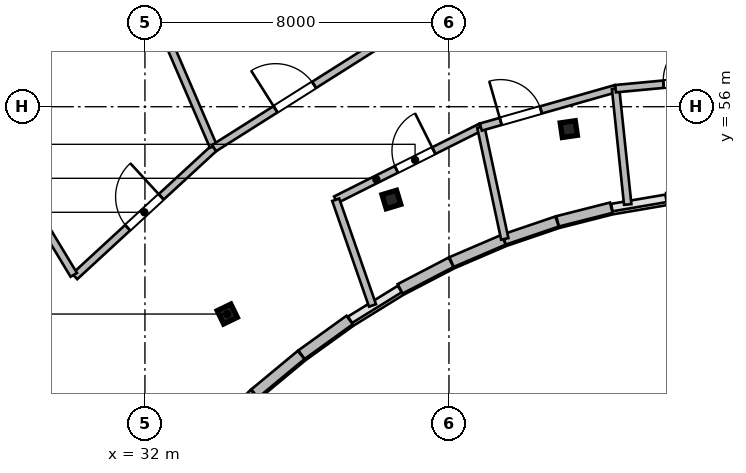
"""IFC4 building model, lengths in metres.
Left out: names, types, materials, properties, quantities, classifications, styles, units other than length and angle.
Written with IfcOpenShell. Run it as: python <this file> out.ifc"""

import sys

from ifc_helpers import new_model, si_unit, direction, frame, frame_2d, origin, origin_2d, place, context, subcontext, project, spatial, rectangle, i_section, extrude, source, transform, mapped, element, fill, save


model = new_model("IFC4")
c1 = context("Model", 3, precision=1e-05, world=origin(), true_north=direction((0.0, 1.0)))
c2 = subcontext(c1, "Body", "Model", "MODEL_VIEW")
j1 = project(units=[si_unit("LENGTHUNIT", "METRE"), si_unit("PLANEANGLEUNIT", "RADIAN")], contexts=[c1])
p1 = place(None, origin())
s1 = spatial("IfcSite", under=j1, at=p1, CompositionType="ELEMENT")
p2 = place(p1, origin())
s2 = spatial("IfcBuilding", under=s1, at=p2, CompositionType="ELEMENT")
p3 = place(p2, frame((0.0, 0.0, 279.6)))
s3 = spatial("IfcBuildingStorey", under=s2, at=p3, CompositionType="ELEMENT", Elevation=279.6)
m1 = source(origin(), c2, "Body", "SweptSolid", [
    extrude(i_section(OverallWidth=0.399, OverallDepth=0.387, WebThickness=0.021, FlangeThickness=0.033, at=origin_2d()), origin(), (0.0, 0.0, 1.0), 3.9),
])
for number, where, z_axis, x_axis in (
    (1, (34.166, 50.545, 0.0), (0.0, 0.0, 1.0), (-0.436, 0.9, 0.0)),
    (2, (38.485, 53.558, 0.0), (0.0, 0.0, 1.0), (-0.289, 0.957, 0.0)),
    (3, (43.154, 55.411, 0.0), (0.0, 0.0, 1.0), (-0.143, 0.99, 0.0)),
):
    element("IfcColumn", number, at=place(p3, frame(where, z_axis=z_axis, x_axis=x_axis)), inside=s3, PredefinedType="COLUMN", context=c2, shape_type="MappedRepresentation", body=[
        mapped(m1, transform((0.0, 0.0, 0.0), scale=1.0)),
    ])
m2 = source(origin(), c2, "Body", "SweptSolid", [
    extrude(rectangle(XDim=1.458, YDim=0.28, at=frame_2d((0.729, 0.0))), origin(), (0.0, 0.0, 1.0), 3.64),
])
p4 = place(p3, frame((44.271, 53.343, 0.0), z_axis=(0.0, 0.0, 1.0), x_axis=(-0.969109544438, -0.246630677083, 0.0)))
e4 = element("IfcWall", 4, at=p4, inside=s3, PredefinedType="SOLIDWALL", context=c2, shape_type="MappedRepresentation", body=[
    mapped(m2, transform((0.0, 0.0, 0.0), scale=1.0)),
])
m3 = source(origin(), c2, "Body", "SweptSolid", [
    extrude(rectangle(XDim=1.473, YDim=0.28, at=frame_2d((0.736, 0.0))), origin(), (0.0, 0.0, 1.0), 3.64),
])
p5 = place(p3, frame((42.845, 52.979, 0.0), z_axis=(0.0, 0.0, 1.0), x_axis=(-0.946641296917, -0.322289086026, 0.0)))
e5 = element("IfcWall", 5, at=p5, inside=s3, PredefinedType="SOLIDWALL", context=c2, shape_type="MappedRepresentation", body=[
    mapped(m3, transform((0.0, 0.0, 0.0), scale=1.0)),
])
m4 = source(origin(), c2, "Body", "SweptSolid", [
    extrude(rectangle(XDim=1.49, YDim=0.28, at=frame_2d((0.745, 0.0))), origin(), (0.0, 0.0, 1.0), 3.64),
])
p6 = place(p3, frame((41.438, 52.5, 0.0), z_axis=(0.0, 0.0, 1.0), x_axis=(-0.919009427656, -0.394235553799, 0.0)))
e6 = element("IfcWall", 6, at=p6, inside=s3, PredefinedType="SOLIDWALL", context=c2, shape_type="MappedRepresentation", body=[
    mapped(m4, transform((0.0, 0.0, 0.0), scale=1.0)),
])
m5 = source(origin(), c2, "Body", "SweptSolid", [
    extrude(rectangle(XDim=1.512, YDim=0.28, at=frame_2d((0.756, 0.0))), origin(), (0.0, 0.0, 1.0), 3.64),
])
p7 = place(p3, frame((40.056, 51.906, 0.0), z_axis=(0.0, 0.0, 1.0), x_axis=(-0.886841011195, -0.462074691865, 0.0)))
e7 = element("IfcWall", 7, at=p7, inside=s3, PredefinedType="SOLIDWALL", context=c2, shape_type="MappedRepresentation", body=[
    mapped(m5, transform((0.0, 0.0, 0.0), scale=1.0)),
])
m6 = source(origin(), c2, "Body", "SweptSolid", [
    extrude(rectangle(XDim=1.561, YDim=0.28, at=frame_2d((0.781, 0.0))), origin(), (0.0, 0.0, 1.0), 3.64),
])
p8 = place(p3, frame((37.387, 50.387, 0.0), z_axis=(0.0, 0.0, 1.0), x_axis=(-0.81154027425, -0.584296485758, 0.0)))
e8 = element("IfcWall", 8, at=p8, inside=s3, PredefinedType="SOLIDWALL", context=c2, shape_type="MappedRepresentation", body=[
    mapped(m6, transform((0.0, 0.0, 0.0), scale=1.0)),
])
m7 = source(origin(), c2, "Body", "SweptSolid", [
    extrude(rectangle(XDim=1.589, YDim=0.28, at=frame_2d((0.794, 0.0))), origin(), (0.0, 0.0, 1.0), 3.64),
])
p9 = place(p3, frame((36.11, 49.468, 0.0), z_axis=(0.0, 0.0, 1.0), x_axis=(-0.769805836273, -0.63827813251, 0.0)))
e9 = element("IfcWall", 9, at=p9, inside=s3, PredefinedType="SOLIDWALL", context=c2, shape_type="MappedRepresentation", body=[
    mapped(m7, transform((0.0, 0.0, 0.0), scale=1.0)),
])
m8 = source(origin(), c2, "Body", "SweptSolid", [
    extrude(rectangle(XDim=1.577, YDim=0.28, at=frame_2d((0.789, 0.0))), origin(), (0.0, 0.0, 1.0), 3.64),
])
p10 = place(p3, frame((34.878, 48.446, 0.0), z_axis=(0.0, 0.0, 1.0), x_axis=(-0.726119464467, -0.687568558998, 0.0)))
e10 = element("IfcWall", 10, at=p10, inside=s3, PredefinedType="SOLIDWALL", context=c2, shape_type="MappedRepresentation", body=[
    mapped(m8, transform((0.0, 0.0, 0.0), scale=1.0)),
])
m9 = source(origin(), c2, "Body", "SweptSolid", [
    extrude(rectangle(XDim=4.271, YDim=0.195, at=frame_2d((2.135, 0.0))), origin(), (0.0, 0.0, 1.0), 3.64),
])
p11 = place(p3, frame((37.021, 53.552, 0.0), z_axis=(0.0, 0.0, 1.0), x_axis=(0.894061035522, 0.447945158207, 0.0)))
e11 = element("IfcWall", 11, at=p11, inside=s3, PredefinedType="PARTITIONING", context=c2, shape_type="MappedRepresentation", body=[
    mapped(m9, transform((0.0, 0.0, 0.0), scale=1.0)),
])
p12 = place(p11, frame((1.785, 0.0, 0.0)))
e12 = element("IfcOpeningElement", 12, at=p12, cuts=e11, PredefinedType="OPENING", context=c2, shape_type="SweptSolid", body=[
    extrude(rectangle(XDim=1.1, YDim=2.15, at=frame_2d((0.55, 1.075))), frame((0.0, 0.107, 0.0), z_axis=(0.0, -1.0, 0.0), x_axis=(1.0, 0.0, 0.0)), (0.0, 0.0, 1.0), 0.215),
])
m10 = source(origin(), c2, "Body", "SweptSolid", [
    extrude(rectangle(XDim=2.944, YDim=0.195, at=frame_2d((1.472, 0.0))), origin(), (0.0, 0.0, 1.0), 3.64),
])
p13 = place(p3, frame((37.988, 50.771, 0.0), z_axis=(0.0, 0.0, 1.0), x_axis=(-0.328565655286, 0.944481132774, 0.0)))
e13 = element("IfcWall", 13, at=p13, inside=s3, PredefinedType="PARTITIONING", context=c2, shape_type="MappedRepresentation", body=[
    mapped(m10, transform((0.0, 0.0, 0.0), scale=1.0)),
])
m11 = source(origin(), c2, "Body", "SweptSolid", [
    extrude(rectangle(XDim=3.01, YDim=0.195, at=frame_2d((1.505, 0.0))), origin(), (0.0, 0.0, 1.0), 3.64),
])
p14 = place(p3, frame((41.469, 52.521, 0.0), z_axis=(0.0, 0.0, 1.0), x_axis=(-0.209279797988, 0.977855800287, 0.0)))
e14 = element("IfcWall", 14, at=p14, inside=s3, PredefinedType="PARTITIONING", context=c2, shape_type="MappedRepresentation", body=[
    mapped(m11, transform((0.0, 0.0, 0.0), scale=1.0)),
])
m12 = source(origin(), c2, "Body", "SweptSolid", [
    extrude(rectangle(XDim=3.687, YDim=0.195, at=frame_2d((1.843, 0.0))), origin(), (0.0, 0.0, 1.0), 3.64),
])
p15 = place(p3, frame((40.839, 55.465, 0.0), z_axis=(0.0, 0.0, 1.0), x_axis=(0.961753532248, 0.27391630694, 0.0)))
e15 = element("IfcWall", 15, at=p15, inside=s3, PredefinedType="PARTITIONING", context=c2, shape_type="MappedRepresentation", body=[
    mapped(m12, transform((0.0, 0.0, 0.0), scale=1.0)),
])
p16 = place(p15, frame((0.543, 0.0, 0.0)))
e16 = element("IfcOpeningElement", 16, at=p16, cuts=e15, PredefinedType="OPENING", context=c2, shape_type="SweptSolid", body=[
    extrude(rectangle(XDim=1.1, YDim=2.15, at=frame_2d((0.55, 1.075))), frame((0.0, 0.107, 0.0), z_axis=(0.0, -1.0, 0.0), x_axis=(1.0, 0.0, 0.0)), (0.0, 0.0, 1.0), 0.215),
])
m13 = source(origin(), c2, "Body", "SweptSolid", [
    extrude(rectangle(XDim=3.063, YDim=0.195, at=frame_2d((1.532, 0.0))), origin(), (0.0, 0.0, 1.0), 3.64),
])
p17 = place(p3, frame((44.704, 53.427, 0.0), z_axis=(0.0, 0.0, 1.0), x_axis=(-0.104315578516, 0.994544247421, 0.0)))
e17 = element("IfcWall", 17, at=p17, inside=s3, PredefinedType="PARTITIONING", context=c2, shape_type="MappedRepresentation", body=[
    mapped(m13, transform((0.0, 0.0, 0.0), scale=1.0)),
])
m14 = source(origin(), c2, "Body", "SweptSolid", [
    extrude(rectangle(XDim=3.632, YDim=0.195, at=frame_2d((1.816, 0.0))), origin(), (0.0, 0.0, 1.0), 3.64),
])
p18 = place(p3, frame((44.384, 56.474, 0.0), z_axis=(0.0, 0.0, 1.0), x_axis=(0.99563695898, 0.093311552942, 0.0)))
e18 = element("IfcWall", 18, at=p18, inside=s3, PredefinedType="PARTITIONING", context=c2, shape_type="MappedRepresentation", body=[
    mapped(m14, transform((0.0, 0.0, 0.0), scale=1.0)),
])
p19 = place(p18, frame((1.266, 0.0, 0.0)))
e19 = element("IfcOpeningElement", 19, at=p19, cuts=e18, PredefinedType="OPENING", context=c2, shape_type="SweptSolid", body=[
    extrude(rectangle(XDim=1.1, YDim=2.15, at=frame_2d((0.55, 1.075))), frame((0.0, 0.107, 0.0), z_axis=(0.0, -1.0, 0.0), x_axis=(1.0, 0.0, 0.0)), (0.0, 0.0, 1.0), 0.215),
])
m15 = source(origin(), c2, "Body", "SweptSolid", [
    extrude(rectangle(XDim=4.986, YDim=0.195, at=frame_2d((2.493, 0.0))), origin(), (0.0, 0.0, 1.0), 3.64),
])
p20 = place(p3, frame((30.153, 51.533, 0.0), z_axis=(0.0, 0.0, 1.0), x_axis=(0.735595190169, 0.677421372707, 0.0)))
e20 = element("IfcWall", 20, at=p20, inside=s3, PredefinedType="PARTITIONING", context=c2, shape_type="MappedRepresentation", body=[
    mapped(m15, transform((0.0, 0.0, 0.0), scale=1.0)),
])
p21 = place(p20, frame((1.893, 0.0, 0.0)))
e21 = element("IfcOpeningElement", 21, at=p21, cuts=e20, PredefinedType="OPENING", context=c2, shape_type="SweptSolid", body=[
    extrude(rectangle(XDim=1.2, YDim=2.15, at=frame_2d((0.6, 1.075))), frame((0.0, 0.107, 0.0), z_axis=(0.0, -1.0, 0.0), x_axis=(1.0, 0.0, 0.0)), (0.0, 0.0, 1.0), 0.215),
])
m16 = source(origin(), c2, "Body", "SweptSolid", [
    extrude(rectangle(XDim=16.121, YDim=0.195, at=frame_2d((8.061, 0.0))), origin(), (0.0, 0.0, 1.0), 3.64),
])
p22 = place(p3, frame((30.127, 51.575, 0.0), z_axis=(0.0, 0.0, 1.0), x_axis=(-0.517212483904, 0.855857024563, 0.0)))
e22 = element("IfcWall", 22, at=p22, inside=s3, PredefinedType="PARTITIONING", context=c2, shape_type="MappedRepresentation", body=[
    mapped(m16, transform((0.0, 0.0, 0.0), scale=1.0)),
])
m17 = source(origin(), c2, "Body", "SweptSolid", [
    extrude(rectangle(XDim=17.556, YDim=0.195, at=frame_2d((8.778, 0.0))), origin(), (0.0, 0.0, 1.0), 3.64),
])
p23 = place(p3, frame((33.8, 54.958, 0.0), z_axis=(0.0, 0.0, 1.0), x_axis=(-0.395687598313, 0.918385172213, 0.0)))
e23 = element("IfcWall", 23, at=p23, inside=s3, PredefinedType="PARTITIONING", context=c2, shape_type="MappedRepresentation", body=[
    mapped(m17, transform((0.0, 0.0, 0.0), scale=1.0)),
])
m18 = source(origin(), c2, "Body", "SweptSolid", [
    extrude(rectangle(XDim=5.025, YDim=0.195, at=frame_2d((2.513, 0.0))), origin(), (0.0, 0.0, 1.0), 3.64),
])
p24 = place(p3, frame((33.82, 54.911, 0.0), z_axis=(0.0, 0.0, 1.0), x_axis=(0.84532378062, 0.534254345717, 0.0)))
e24 = element("IfcWall", 24, at=p24, inside=s3, PredefinedType="PARTITIONING", context=c2, shape_type="MappedRepresentation", body=[
    mapped(m18, transform((0.0, 0.0, 0.0), scale=1.0)),
])
p25 = place(p24, frame((1.913, 0.0, 0.0)))
e25 = element("IfcOpeningElement", 25, at=p25, cuts=e24, PredefinedType="OPENING", context=c2, shape_type="SweptSolid", body=[
    extrude(rectangle(XDim=1.2, YDim=2.15, at=frame_2d((0.6, 1.075))), frame((0.0, 0.107, 0.0), z_axis=(0.0, -1.0, 0.0), x_axis=(1.0, 0.0, 0.0)), (0.0, 0.0, 1.0), 0.215),
])
m19 = source(origin(), c2, "Body", "SweptSolid", [
    extrude(rectangle(XDim=1.1, YDim=2.15, at=frame_2d((0.55, 1.075))), frame((0.0, 0.025, 0.0), z_axis=(0.0, -1.0, 0.0), x_axis=(1.0, 0.0, 0.0)), (0.0, 0.0, 1.0), 0.05),
])
p26 = place(p12, origin())
e26 = element("IfcDoor", 26, at=p26, inside=s3, OperationType="SINGLE_SWING_RIGHT", PredefinedType="DOOR", context=c2, shape_type="MappedRepresentation", body=[
    mapped(m19, transform((0.0, 0.0, 0.0), scale=1.0)),
])
fill(e12, e26)
p27 = place(p16, origin())
e27 = element("IfcDoor", 27, at=p27, inside=s3, OperationType="SINGLE_SWING_LEFT", PredefinedType="DOOR", context=c2, shape_type="MappedRepresentation", body=[
    mapped(m19, transform((0.0, 0.0, 0.0), scale=1.0)),
])
fill(e16, e27)
p28 = place(p19, origin())
e28 = element("IfcDoor", 28, at=p28, inside=s3, OperationType="SINGLE_SWING_RIGHT", PredefinedType="DOOR", context=c2, shape_type="MappedRepresentation", body=[
    mapped(m19, transform((0.0, 0.0, 0.0), scale=1.0)),
])
fill(e19, e28)
m20 = source(origin(), c2, "Body", "SweptSolid", [
    extrude(rectangle(XDim=1.2, YDim=2.15, at=frame_2d((0.6, 1.075))), frame((0.0, 0.025, 0.0), z_axis=(0.0, -1.0, 0.0), x_axis=(1.0, 0.0, 0.0)), (0.0, 0.0, 1.0), 0.05),
])
p29 = place(p21, origin())
e29 = element("IfcDoor", 29, at=p29, inside=s3, OperationType="SINGLE_SWING_RIGHT", PredefinedType="DOOR", context=c2, shape_type="MappedRepresentation", body=[
    mapped(m20, transform((0.0, 0.0, 0.0), scale=1.0)),
])
fill(e21, e29)
p30 = place(p25, origin())
e30 = element("IfcDoor", 30, at=p30, inside=s3, OperationType="SINGLE_SWING_LEFT", PredefinedType="DOOR", context=c2, shape_type="MappedRepresentation", body=[
    mapped(m20, transform((0.0, 0.0, 0.0), scale=1.0)),
])
fill(e25, e30)
save(model, sys.argv[1])
